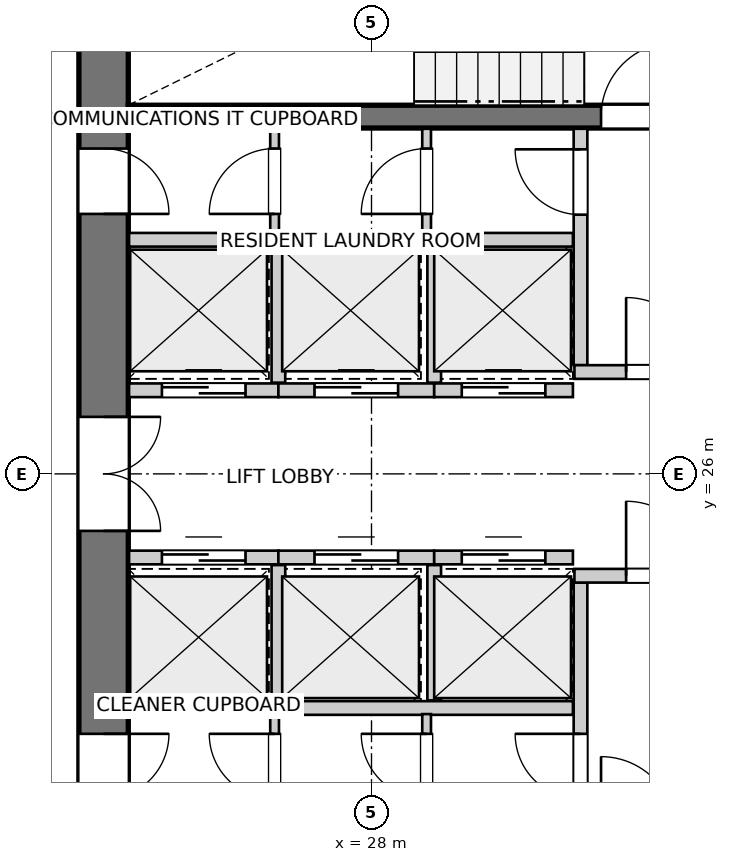
"""IFC4 building model, lengths in metres.
Left out: names, types, materials, properties, quantities, classifications, styles, units other than length and angle.
Written with IfcOpenShell. Run it as: python <this file> out.ifc"""

import sys

from ifc_helpers import new_model, si_unit, direction, frame, frame_2d, origin, place, context, subcontext, project, spatial, rectangle, extrude, source, transform, mapped, element, fill, save


model = new_model("IFC4")
c1 = context("Model", 3, precision=1e-05, world=origin(), true_north=direction((0.0, 1.0)))
c2 = subcontext(c1, "Body", "Model", "MODEL_VIEW")
j1 = project(units=[si_unit("LENGTHUNIT", "METRE"), si_unit("PLANEANGLEUNIT", "RADIAN")], contexts=[c1])
p1 = place(None, origin())
s1 = spatial("IfcSite", under=j1, at=p1, CompositionType="ELEMENT")
p2 = place(p1, origin())
s2 = spatial("IfcBuilding", under=s1, at=p2, CompositionType="ELEMENT")
p3 = place(p2, frame((0.0, 0.0, 124.8)))
s3 = spatial("IfcBuildingStorey", under=s2, at=p3, CompositionType="ELEMENT", Elevation=124.8)
p4 = place(p3, frame((24.475, 33.8, 0.0), z_axis=(0.0, 0.0, 1.0), x_axis=(0.0, -1.0, 0.0)))
e1 = element("IfcWall", 1, at=p4, inside=s3, PredefinedType="SHEAR", context=c2, shape_type="SweptSolid", body=[
    extrude(rectangle(XDim=15.6, YDim=0.65, at=frame_2d((7.8, 0.0))), origin(), (0.0, 0.0, 1.0), 2.9),
])
p5 = place(p4, frame((7.05, 0.0, 0.0)))
e2 = element("IfcOpeningElement", 2, at=p5, cuts=e1, PredefinedType="OPENING", context=c2, shape_type="SweptSolid", body=[
    extrude(rectangle(XDim=1.5, YDim=2.15, at=frame_2d((0.75, 1.075))), frame((0.0, 0.335, 0.0), z_axis=(0.0, -1.0, 0.0), x_axis=(1.0, 0.0, 0.0)), (0.0, 0.0, 1.0), 0.67),
])
p6 = place(p4, frame((3.52, 0.0, 0.0)))
e3 = element("IfcOpeningElement", 3, at=p6, cuts=e1, PredefinedType="OPENING", context=c2, shape_type="SweptSolid", body=[
    extrude(rectangle(XDim=0.86, YDim=2.05, at=frame_2d((0.43, 1.025))), frame((0.0, 0.335, 0.0), z_axis=(0.0, -1.0, 0.0), x_axis=(1.0, 0.0, 0.0)), (0.0, 0.0, 1.0), 0.67),
])
p7 = place(p4, frame((11.22, 0.0, 0.0)))
e4 = element("IfcOpeningElement", 4, at=p7, cuts=e1, PredefinedType="OPENING", context=c2, shape_type="SweptSolid", body=[
    extrude(rectangle(XDim=0.86, YDim=2.05, at=frame_2d((0.43, 1.025))), frame((0.0, 0.335, 0.0), z_axis=(0.0, -1.0, 0.0), x_axis=(1.0, 0.0, 0.0)), (0.0, 0.0, 1.0), 0.67),
])
p8 = place(p3, frame((24.8, 30.7, 0.0), z_axis=(0.0, 0.0, 1.0), x_axis=(1.0, 0.0, 0.0)))
e5 = element("IfcWall", 5, at=p8, inside=s3, PredefinedType="SHEAR", context=c2, shape_type="SweptSolid", body=[
    extrude(rectangle(XDim=11.1, YDim=0.3, at=frame_2d((5.55, 0.0))), origin(), (0.0, 0.0, 1.0), 2.9),
])
p9 = place(p8, frame((6.22, 0.0, 0.0)))
e6 = element("IfcOpeningElement", 6, at=p9, cuts=e5, PredefinedType="OPENING", context=c2, shape_type="SweptSolid", body=[
    extrude(rectangle(XDim=0.98, YDim=2.15, at=frame_2d((0.49, 1.075))), frame((0.0, 0.16, 0.0), z_axis=(0.0, -1.0, 0.0), x_axis=(1.0, 0.0, 0.0)), (0.0, 0.0, 1.0), 0.32),
])
p10 = place(p8, frame((9.15, 0.0, 0.0)))
e7 = element("IfcOpeningElement", 7, at=p10, cuts=e5, PredefinedType="OPENING", context=c2, shape_type="SweptSolid", body=[
    extrude(rectangle(XDim=1.15, YDim=2.15, at=frame_2d((0.575, 1.075))), frame((0.0, 0.16, 0.0), z_axis=(0.0, -1.0, 0.0), x_axis=(1.0, 0.0, 0.0)), (0.0, 0.0, 1.0), 0.32),
])
p11 = place(p3, frame((30.75, 21.46, 0.0), z_axis=(0.0, 0.0, 1.0), x_axis=(0.0, 1.0, 0.0)))
e8 = element("IfcWall", 8, at=p11, inside=s3, PredefinedType="PARTITIONING", context=c2, shape_type="SweptSolid", body=[
    extrude(rectangle(XDim=3.11, YDim=0.18, at=frame_2d((1.555, 0.0))), origin(), (0.0, 0.0, 1.0), 2.9),
])
p12 = place(p11, frame((0.26, 0.0, 0.0)))
e9 = element("IfcOpeningElement", 9, at=p12, cuts=e8, PredefinedType="OPENING", context=c2, shape_type="SweptSolid", body=[
    extrude(rectangle(XDim=0.86, YDim=2.05, at=frame_2d((0.43, 1.025))), frame((0.0, 0.1, 0.0), z_axis=(0.0, -1.0, 0.0), x_axis=(1.0, 0.0, 0.0)), (0.0, 0.0, 1.0), 0.2),
])
p13 = place(p3, frame((30.67, 24.66, 0.0), z_axis=(0.0, 0.0, 1.0), x_axis=(1.0, 0.0, 0.0)))
e10 = element("IfcWall", 10, at=p13, inside=s3, PredefinedType="PARTITIONING", context=c2, shape_type="SweptSolid", body=[
    extrude(rectangle(XDim=5.22, YDim=0.18, at=frame_2d((2.61, 0.0))), origin(), (0.0, 0.0, 1.0), 2.9),
])
p14 = place(p13, frame((0.68, 0.0, 0.0)))
e11 = element("IfcOpeningElement", 11, at=p14, cuts=e10, PredefinedType="OPENING", context=c2, shape_type="SweptSolid", body=[
    extrude(rectangle(XDim=0.98, YDim=2.15, at=frame_2d((0.49, 1.075))), frame((0.0, 0.1, 0.0), z_axis=(0.0, -1.0, 0.0), x_axis=(1.0, 0.0, 0.0)), (0.0, 0.0, 1.0), 0.2),
])
p15 = place(p3, frame((30.75, 27.43, 0.0), z_axis=(0.0, 0.0, 1.0), x_axis=(0.0, 1.0, 0.0)))
e12 = element("IfcWall", 12, at=p15, inside=s3, PredefinedType="PARTITIONING", context=c2, shape_type="SweptSolid", body=[
    extrude(rectangle(XDim=3.11, YDim=0.18, at=frame_2d((1.555, 0.0))), origin(), (0.0, 0.0, 1.0), 2.9),
])
p16 = place(p15, frame((1.98, 0.0, 0.0)))
e13 = element("IfcOpeningElement", 13, at=p16, cuts=e12, PredefinedType="OPENING", context=c2, shape_type="SweptSolid", body=[
    extrude(rectangle(XDim=0.86, YDim=2.05, at=frame_2d((0.43, 1.025))), frame((0.0, 0.1, 0.0), z_axis=(0.0, -1.0, 0.0), x_axis=(1.0, 0.0, 0.0)), (0.0, 0.0, 1.0), 0.2),
])
p17 = place(p3, frame((30.67, 27.34, 0.0), z_axis=(0.0, 0.0, 1.0), x_axis=(1.0, 0.0, 0.0)))
e14 = element("IfcWall", 14, at=p17, inside=s3, PredefinedType="PARTITIONING", context=c2, shape_type="SweptSolid", body=[
    extrude(rectangle(XDim=5.22, YDim=0.18, at=frame_2d((2.61, 0.0))), origin(), (0.0, 0.0, 1.0), 2.9),
])
p18 = place(p17, frame((0.68, 0.0, 0.0)))
e15 = element("IfcOpeningElement", 15, at=p18, cuts=e14, PredefinedType="OPENING", context=c2, shape_type="SweptSolid", body=[
    extrude(rectangle(XDim=0.98, YDim=2.15, at=frame_2d((0.49, 1.075))), frame((0.0, 0.1, 0.0), z_axis=(0.0, -1.0, 0.0), x_axis=(1.0, 0.0, 0.0)), (0.0, 0.0, 1.0), 0.2),
])
p19 = place(p3, frame((24.81, 22.92, 0.0), z_axis=(0.0, 0.0, 1.0), x_axis=(1.0, 0.0, 0.0)))
e16 = element("IfcWall", 16, at=p19, inside=s3, PredefinedType="PARTITIONING", context=c2, shape_type="SweptSolid", body=[
    extrude(rectangle(XDim=5.84, YDim=0.18, at=frame_2d((2.92, 0.0))), origin(), (0.0, 0.0, 1.0), 2.9),
])
p20 = place(p3, frame((24.81, 24.9, 0.0), z_axis=(0.0, 0.0, 1.0), x_axis=(1.0, 0.0, 0.0)))
e17 = element("IfcWall", 17, at=p20, inside=s3, PredefinedType="PARTITIONING", context=c2, shape_type="SweptSolid", body=[
    extrude(rectangle(XDim=1.965, YDim=0.18, at=frame_2d((0.982, 0.0))), origin(), (0.0, 0.0, 1.0), 2.9),
])
p21 = place(p20, frame((0.433, 0.0, 0.0)))
e18 = element("IfcOpeningElement", 18, at=p21, cuts=e17, PredefinedType="OPENING", context=c2, shape_type="SweptSolid", body=[
    extrude(rectangle(XDim=1.1, YDim=2.15, at=frame_2d((0.55, 1.075))), frame((0.0, 0.1, 0.0), z_axis=(0.0, -1.0, 0.0), x_axis=(1.0, 0.0, 0.0)), (0.0, 0.0, 1.0), 0.2),
])
p22 = place(p3, frame((26.775, 24.9, 0.0), z_axis=(0.0, 0.0, 1.0), x_axis=(1.0, 0.0, 0.0)))
e19 = element("IfcWall", 19, at=p22, inside=s3, PredefinedType="PARTITIONING", context=c2, shape_type="SweptSolid", body=[
    extrude(rectangle(XDim=2.05, YDim=0.18, at=frame_2d((1.025, 0.0))), origin(), (0.0, 0.0, 1.0), 2.9),
])
p23 = place(p22, frame((0.475, 0.0, 0.0)))
e20 = element("IfcOpeningElement", 20, at=p23, cuts=e19, PredefinedType="OPENING", context=c2, shape_type="SweptSolid", body=[
    extrude(rectangle(XDim=1.1, YDim=2.15, at=frame_2d((0.55, 1.075))), frame((0.0, 0.1, 0.0), z_axis=(0.0, -1.0, 0.0), x_axis=(1.0, 0.0, 0.0)), (0.0, 0.0, 1.0), 0.2),
])
p24 = place(p3, frame((26.775, 23.02, 0.0), z_axis=(0.0, 0.0, 1.0), x_axis=(0.0, 1.0, 0.0)))
e21 = element("IfcWall", 21, at=p24, inside=s3, PredefinedType="PARTITIONING", context=c2, shape_type="SweptSolid", body=[
    extrude(rectangle(XDim=1.78, YDim=0.18, at=frame_2d((0.89, 0.0))), origin(), (0.0, 0.0, 1.0), 2.9),
])
p25 = place(p3, frame((28.825, 24.9, 0.0), z_axis=(0.0, 0.0, 1.0), x_axis=(1.0, 0.0, 0.0)))
e22 = element("IfcWall", 22, at=p25, inside=s3, PredefinedType="PARTITIONING", context=c2, shape_type="SweptSolid", body=[
    extrude(rectangle(XDim=1.825, YDim=0.18, at=frame_2d((0.913, 0.0))), origin(), (0.0, 0.0, 1.0), 2.9),
])
p26 = place(p25, frame((0.363, 0.0, 0.0)))
e23 = element("IfcOpeningElement", 23, at=p26, cuts=e22, PredefinedType="OPENING", context=c2, shape_type="SweptSolid", body=[
    extrude(rectangle(XDim=1.1, YDim=2.15, at=frame_2d((0.55, 1.075))), frame((0.0, 0.1, 0.0), z_axis=(0.0, -1.0, 0.0), x_axis=(1.0, 0.0, 0.0)), (0.0, 0.0, 1.0), 0.2),
])
p27 = place(p3, frame((28.825, 23.02, 0.0), z_axis=(0.0, 0.0, 1.0), x_axis=(0.0, 1.0, 0.0)))
e24 = element("IfcWall", 24, at=p27, inside=s3, PredefinedType="PARTITIONING", context=c2, shape_type="SweptSolid", body=[
    extrude(rectangle(XDim=1.78, YDim=0.18, at=frame_2d((0.89, 0.0))), origin(), (0.0, 0.0, 1.0), 2.9),
])
p28 = place(p3, frame((24.81, 29.08, 0.0), z_axis=(0.0, 0.0, 1.0), x_axis=(1.0, 0.0, 0.0)))
e25 = element("IfcWall", 25, at=p28, inside=s3, PredefinedType="PARTITIONING", context=c2, shape_type="SweptSolid", body=[
    extrude(rectangle(XDim=5.84, YDim=0.18, at=frame_2d((2.92, 0.0))), origin(), (0.0, 0.0, 1.0), 2.9),
])
p29 = place(p3, frame((24.81, 27.1, 0.0), z_axis=(0.0, 0.0, 1.0), x_axis=(1.0, 0.0, 0.0)))
e26 = element("IfcWall", 26, at=p29, inside=s3, PredefinedType="PARTITIONING", context=c2, shape_type="SweptSolid", body=[
    extrude(rectangle(XDim=1.965, YDim=0.18, at=frame_2d((0.982, 0.0))), origin(), (0.0, 0.0, 1.0), 2.9),
])
p30 = place(p29, frame((0.433, 0.0, 0.0)))
e27 = element("IfcOpeningElement", 27, at=p30, cuts=e26, PredefinedType="OPENING", context=c2, shape_type="SweptSolid", body=[
    extrude(rectangle(XDim=1.1, YDim=2.15, at=frame_2d((0.55, 1.075))), frame((0.0, 0.1, 0.0), z_axis=(0.0, -1.0, 0.0), x_axis=(1.0, 0.0, 0.0)), (0.0, 0.0, 1.0), 0.2),
])
p31 = place(p3, frame((26.775, 27.1, 0.0), z_axis=(0.0, 0.0, 1.0), x_axis=(1.0, 0.0, 0.0)))
e28 = element("IfcWall", 28, at=p31, inside=s3, PredefinedType="PARTITIONING", context=c2, shape_type="SweptSolid", body=[
    extrude(rectangle(XDim=2.05, YDim=0.18, at=frame_2d((1.025, 0.0))), origin(), (0.0, 0.0, 1.0), 2.9),
])
p32 = place(p31, frame((0.475, 0.0, 0.0)))
e29 = element("IfcOpeningElement", 29, at=p32, cuts=e28, PredefinedType="OPENING", context=c2, shape_type="SweptSolid", body=[
    extrude(rectangle(XDim=1.1, YDim=2.15, at=frame_2d((0.55, 1.075))), frame((0.0, 0.1, 0.0), z_axis=(0.0, -1.0, 0.0), x_axis=(1.0, 0.0, 0.0)), (0.0, 0.0, 1.0), 0.2),
])
p33 = place(p3, frame((26.775, 27.2, 0.0), z_axis=(0.0, 0.0, 1.0), x_axis=(0.0, 1.0, 0.0)))
e30 = element("IfcWall", 30, at=p33, inside=s3, PredefinedType="PARTITIONING", context=c2, shape_type="SweptSolid", body=[
    extrude(rectangle(XDim=1.78, YDim=0.18, at=frame_2d((0.89, 0.0))), origin(), (0.0, 0.0, 1.0), 2.9),
])
p34 = place(p3, frame((28.825, 27.1, 0.0), z_axis=(0.0, 0.0, 1.0), x_axis=(1.0, 0.0, 0.0)))
e31 = element("IfcWall", 31, at=p34, inside=s3, PredefinedType="PARTITIONING", context=c2, shape_type="SweptSolid", body=[
    extrude(rectangle(XDim=1.825, YDim=0.18, at=frame_2d((0.913, 0.0))), origin(), (0.0, 0.0, 1.0), 2.9),
])
p35 = place(p34, frame((0.363, 0.0, 0.0)))
e32 = element("IfcOpeningElement", 32, at=p35, cuts=e31, PredefinedType="OPENING", context=c2, shape_type="SweptSolid", body=[
    extrude(rectangle(XDim=1.1, YDim=2.15, at=frame_2d((0.55, 1.075))), frame((0.0, 0.1, 0.0), z_axis=(0.0, -1.0, 0.0), x_axis=(1.0, 0.0, 0.0)), (0.0, 0.0, 1.0), 0.2),
])
p36 = place(p3, frame((28.825, 27.2, 0.0), z_axis=(0.0, 0.0, 1.0), x_axis=(0.0, 1.0, 0.0)))
e33 = element("IfcWall", 33, at=p36, inside=s3, PredefinedType="PARTITIONING", context=c2, shape_type="SweptSolid", body=[
    extrude(rectangle(XDim=1.78, YDim=0.18, at=frame_2d((0.89, 0.0))), origin(), (0.0, 0.0, 1.0), 2.9),
])
p37 = place(p3, frame((26.725, 21.46, 0.0), z_axis=(0.0, 0.0, 1.0), x_axis=(0.0, 1.0, 0.0)))
e34 = element("IfcWall", 34, at=p37, inside=s3, PredefinedType="PARTITIONING", context=c2, shape_type="SweptSolid", body=[
    extrude(rectangle(XDim=1.38, YDim=0.115, at=frame_2d((0.69, 0.0))), origin(), (0.0, 0.0, 1.0), 2.9),
])
p38 = place(p37, frame((0.26, 0.0, 0.0)))
e35 = element("IfcOpeningElement", 35, at=p38, cuts=e34, PredefinedType="OPENING", context=c2, shape_type="SweptSolid", body=[
    extrude(rectangle(XDim=0.86, YDim=2.05, at=frame_2d((0.43, 1.025))), frame((0.0, 0.067, 0.0), z_axis=(0.0, -1.0, 0.0), x_axis=(1.0, 0.0, 0.0)), (0.0, 0.0, 1.0), 0.135),
])
p39 = place(p3, frame((26.725, 29.16, 0.0), z_axis=(0.0, 0.0, 1.0), x_axis=(0.0, 1.0, 0.0)))
e36 = element("IfcWall", 36, at=p39, inside=s3, PredefinedType="PARTITIONING", context=c2, shape_type="SweptSolid", body=[
    extrude(rectangle(XDim=1.38, YDim=0.115, at=frame_2d((0.69, 0.0))), origin(), (0.0, 0.0, 1.0), 2.9),
])
p40 = place(p39, frame((0.26, 0.0, 0.0)))
e37 = element("IfcOpeningElement", 37, at=p40, cuts=e36, PredefinedType="OPENING", context=c2, shape_type="SweptSolid", body=[
    extrude(rectangle(XDim=0.86, YDim=2.05, at=frame_2d((0.43, 1.025))), frame((0.0, 0.067, 0.0), z_axis=(0.0, -1.0, 0.0), x_axis=(1.0, 0.0, 0.0)), (0.0, 0.0, 1.0), 0.135),
])
p41 = place(p3, frame((28.725, 21.46, 0.0), z_axis=(0.0, 0.0, 1.0), x_axis=(0.0, 1.0, 0.0)))
e38 = element("IfcWall", 38, at=p41, inside=s3, PredefinedType="PARTITIONING", context=c2, shape_type="SweptSolid", body=[
    extrude(rectangle(XDim=1.38, YDim=0.115, at=frame_2d((0.69, 0.0))), origin(), (0.0, 0.0, 1.0), 2.9),
])
p42 = place(p41, frame((0.26, 0.0, 0.0)))
e39 = element("IfcOpeningElement", 39, at=p42, cuts=e38, PredefinedType="OPENING", context=c2, shape_type="SweptSolid", body=[
    extrude(rectangle(XDim=0.86, YDim=2.05, at=frame_2d((0.43, 1.025))), frame((0.0, 0.067, 0.0), z_axis=(0.0, -1.0, 0.0), x_axis=(1.0, 0.0, 0.0)), (0.0, 0.0, 1.0), 0.135),
])
p43 = place(p3, frame((28.725, 29.16, 0.0), z_axis=(0.0, 0.0, 1.0), x_axis=(0.0, 1.0, 0.0)))
e40 = element("IfcWall", 40, at=p43, inside=s3, PredefinedType="PARTITIONING", context=c2, shape_type="SweptSolid", body=[
    extrude(rectangle(XDim=1.38, YDim=0.115, at=frame_2d((0.69, 0.0))), origin(), (0.0, 0.0, 1.0), 2.9),
])
p44 = place(p43, frame((0.26, 0.0, 0.0)))
e41 = element("IfcOpeningElement", 41, at=p44, cuts=e40, PredefinedType="OPENING", context=c2, shape_type="SweptSolid", body=[
    extrude(rectangle(XDim=0.86, YDim=2.05, at=frame_2d((0.43, 1.025))), frame((0.0, 0.067, 0.0), z_axis=(0.0, -1.0, 0.0), x_axis=(1.0, 0.0, 0.0)), (0.0, 0.0, 1.0), 0.135),
])
m1 = source(origin(), c2, "Body", "SweptSolid", [
    extrude(rectangle(XDim=0.98, YDim=2.15, at=frame_2d((0.49, 1.075))), frame((0.0, 0.025, 0.0), z_axis=(0.0, -1.0, 0.0), x_axis=(1.0, 0.0, 0.0)), (0.0, 0.0, 1.0), 0.05),
])
p45 = place(p9, origin())
e42 = element("IfcDoor", 42, at=p45, inside=s3, OperationType="SINGLE_SWING_RIGHT", PredefinedType="DOOR", context=c2, shape_type="MappedRepresentation", body=[
    mapped(m1, transform((0.0, 0.0, 0.0), x_axis=(1.0, 0.0, 0.0), y_axis=(0.0, 1.0, 0.0), z_axis=(0.0, 0.0, 1.0), scale=1.0)),
])
fill(e6, e42)
m2 = source(origin(), c2, "Body", "SweptSolid", [
    extrude(rectangle(XDim=1.5, YDim=2.15, at=frame_2d((0.75, 1.075))), frame((0.0, 0.025, 0.0), z_axis=(0.0, -1.0, 0.0), x_axis=(1.0, 0.0, 0.0)), (0.0, 0.0, 1.0), 0.05),
])
p46 = place(p5, origin())
e43 = element("IfcDoor", 43, at=p46, inside=s3, OperationType="DOUBLE_DOOR_SINGLE_SWING", PredefinedType="DOOR", context=c2, shape_type="MappedRepresentation", body=[
    mapped(m2, transform((0.0, 0.0, 0.0), x_axis=(1.0, 0.0, 0.0), y_axis=(0.0, 1.0, 0.0), z_axis=(0.0, 0.0, 1.0), scale=1.0)),
])
fill(e2, e43)
m3 = source(origin(), c2, "Body", "SweptSolid", [
    extrude(rectangle(XDim=0.86, YDim=2.05, at=frame_2d((0.43, 1.025))), frame((0.0, 0.025, 0.0), z_axis=(0.0, -1.0, 0.0), x_axis=(1.0, 0.0, 0.0)), (0.0, 0.0, 1.0), 0.05),
])
p47 = place(p6, origin())
e44 = element("IfcDoor", 44, at=p47, inside=s3, OperationType="SINGLE_SWING_RIGHT", PredefinedType="DOOR", context=c2, shape_type="MappedRepresentation", body=[
    mapped(m3, transform((0.0, 0.0, 0.0), x_axis=(1.0, 0.0, 0.0), y_axis=(0.0, 1.0, 0.0), z_axis=(0.0, 0.0, 1.0), scale=1.0)),
])
fill(e3, e44)
p48 = place(p7, origin())
e45 = element("IfcDoor", 45, at=p48, inside=s3, OperationType="SINGLE_SWING_LEFT", PredefinedType="DOOR", context=c2, shape_type="MappedRepresentation", body=[
    mapped(m3, transform((0.0, 0.0, 0.0), x_axis=(1.0, 0.0, 0.0), y_axis=(0.0, 1.0, 0.0), z_axis=(0.0, 0.0, 1.0), scale=1.0)),
])
fill(e4, e45)
p49 = place(p12, origin())
e46 = element("IfcDoor", 46, at=p49, inside=s3, OperationType="SINGLE_SWING_RIGHT", PredefinedType="DOOR", context=c2, shape_type="MappedRepresentation", body=[
    mapped(m3, transform((0.0, 0.0, 0.0), x_axis=(1.0, 0.0, 0.0), y_axis=(0.0, 1.0, 0.0), z_axis=(0.0, 0.0, 1.0), scale=1.0)),
])
fill(e9, e46)
p50 = place(p14, origin())
e47 = element("IfcDoor", 47, at=p50, inside=s3, OperationType="SINGLE_SWING_LEFT", PredefinedType="DOOR", context=c2, shape_type="MappedRepresentation", body=[
    mapped(m1, transform((0.0, 0.0, 0.0), x_axis=(1.0, 0.0, 0.0), y_axis=(0.0, 1.0, 0.0), z_axis=(0.0, 0.0, 1.0), scale=1.0)),
])
fill(e11, e47)
p51 = place(p16, origin())
e48 = element("IfcDoor", 48, at=p51, inside=s3, OperationType="SINGLE_SWING_RIGHT", PredefinedType="DOOR", context=c2, shape_type="MappedRepresentation", body=[
    mapped(m3, transform((0.0, 0.0, 0.0), x_axis=(1.0, 0.0, 0.0), y_axis=(0.0, 1.0, 0.0), z_axis=(0.0, 0.0, 1.0), scale=1.0)),
])
fill(e13, e48)
p52 = place(p18, origin())
e49 = element("IfcDoor", 49, at=p52, inside=s3, OperationType="SINGLE_SWING_LEFT", PredefinedType="DOOR", context=c2, shape_type="MappedRepresentation", body=[
    mapped(m1, transform((0.0, 0.0, 0.0), x_axis=(1.0, 0.0, 0.0), y_axis=(0.0, 1.0, 0.0), z_axis=(0.0, 0.0, 1.0), scale=1.0)),
])
fill(e15, e49)
m4 = source(origin(), c2, "Body", "SweptSolid", [
    extrude(rectangle(XDim=1.1, YDim=2.15, at=frame_2d((0.55, 1.075))), frame((0.0, 0.025, 0.0), z_axis=(0.0, -1.0, 0.0), x_axis=(1.0, 0.0, 0.0)), (0.0, 0.0, 1.0), 0.05),
])
p53 = place(p21, origin())
e50 = element("IfcDoor", 50, at=p53, inside=s3, OperationType="DOUBLE_DOOR_SLIDING", PredefinedType="DOOR", context=c2, shape_type="MappedRepresentation", body=[
    mapped(m4, transform((0.0, 0.0, 0.0), x_axis=(1.0, 0.0, 0.0), y_axis=(0.0, 1.0, 0.0), z_axis=(0.0, 0.0, 1.0), scale=1.0)),
])
fill(e18, e50)
p54 = place(p23, origin())
e51 = element("IfcDoor", 51, at=p54, inside=s3, OperationType="DOUBLE_DOOR_SLIDING", PredefinedType="DOOR", context=c2, shape_type="MappedRepresentation", body=[
    mapped(m4, transform((0.0, 0.0, 0.0), x_axis=(1.0, 0.0, 0.0), y_axis=(0.0, 1.0, 0.0), z_axis=(0.0, 0.0, 1.0), scale=1.0)),
])
fill(e20, e51)
p55 = place(p26, origin())
e52 = element("IfcDoor", 52, at=p55, inside=s3, OperationType="DOUBLE_DOOR_SLIDING", PredefinedType="DOOR", context=c2, shape_type="MappedRepresentation", body=[
    mapped(m4, transform((0.0, 0.0, 0.0), x_axis=(1.0, 0.0, 0.0), y_axis=(0.0, 1.0, 0.0), z_axis=(0.0, 0.0, 1.0), scale=1.0)),
])
fill(e23, e52)
p56 = place(p30, origin())
e53 = element("IfcDoor", 53, at=p56, inside=s3, OperationType="DOUBLE_DOOR_SLIDING", PredefinedType="DOOR", context=c2, shape_type="MappedRepresentation", body=[
    mapped(m4, transform((0.0, 0.0, 0.0), x_axis=(1.0, 0.0, 0.0), y_axis=(0.0, 1.0, 0.0), z_axis=(0.0, 0.0, 1.0), scale=1.0)),
])
fill(e27, e53)
p57 = place(p32, origin())
e54 = element("IfcDoor", 54, at=p57, inside=s3, OperationType="DOUBLE_DOOR_SLIDING", PredefinedType="DOOR", context=c2, shape_type="MappedRepresentation", body=[
    mapped(m4, transform((0.0, 0.0, 0.0), x_axis=(1.0, 0.0, 0.0), y_axis=(0.0, 1.0, 0.0), z_axis=(0.0, 0.0, 1.0), scale=1.0)),
])
fill(e29, e54)
p58 = place(p35, origin())
e55 = element("IfcDoor", 55, at=p58, inside=s3, OperationType="DOUBLE_DOOR_SLIDING", PredefinedType="DOOR", context=c2, shape_type="MappedRepresentation", body=[
    mapped(m4, transform((0.0, 0.0, 0.0), x_axis=(1.0, 0.0, 0.0), y_axis=(0.0, 1.0, 0.0), z_axis=(0.0, 0.0, 1.0), scale=1.0)),
])
fill(e32, e55)
p59 = place(p38, origin())
e56 = element("IfcDoor", 56, at=p59, inside=s3, OperationType="SINGLE_SWING_RIGHT", PredefinedType="DOOR", context=c2, shape_type="MappedRepresentation", body=[
    mapped(m3, transform((0.0, 0.0, 0.0), x_axis=(1.0, 0.0, 0.0), y_axis=(0.0, 1.0, 0.0), z_axis=(0.0, 0.0, 1.0), scale=1.0)),
])
fill(e35, e56)
p60 = place(p40, origin())
e57 = element("IfcDoor", 57, at=p60, inside=s3, OperationType="SINGLE_SWING_LEFT", PredefinedType="DOOR", context=c2, shape_type="MappedRepresentation", body=[
    mapped(m3, transform((0.0, 0.0, 0.0), x_axis=(1.0, 0.0, 0.0), y_axis=(0.0, 1.0, 0.0), z_axis=(0.0, 0.0, 1.0), scale=1.0)),
])
fill(e37, e57)
p61 = place(p42, origin())
e58 = element("IfcDoor", 58, at=p61, inside=s3, OperationType="SINGLE_SWING_RIGHT", PredefinedType="DOOR", context=c2, shape_type="MappedRepresentation", body=[
    mapped(m3, transform((0.0, 0.0, 0.0), x_axis=(1.0, 0.0, 0.0), y_axis=(0.0, 1.0, 0.0), z_axis=(0.0, 0.0, 1.0), scale=1.0)),
])
fill(e39, e58)
p62 = place(p44, origin())
e59 = element("IfcDoor", 59, at=p62, inside=s3, OperationType="SINGLE_SWING_LEFT", PredefinedType="DOOR", context=c2, shape_type="MappedRepresentation", body=[
    mapped(m3, transform((0.0, 0.0, 0.0), x_axis=(1.0, 0.0, 0.0), y_axis=(0.0, 1.0, 0.0), z_axis=(0.0, 0.0, 1.0), scale=1.0)),
])
fill(e41, e59)
save(model, sys.argv[1])
